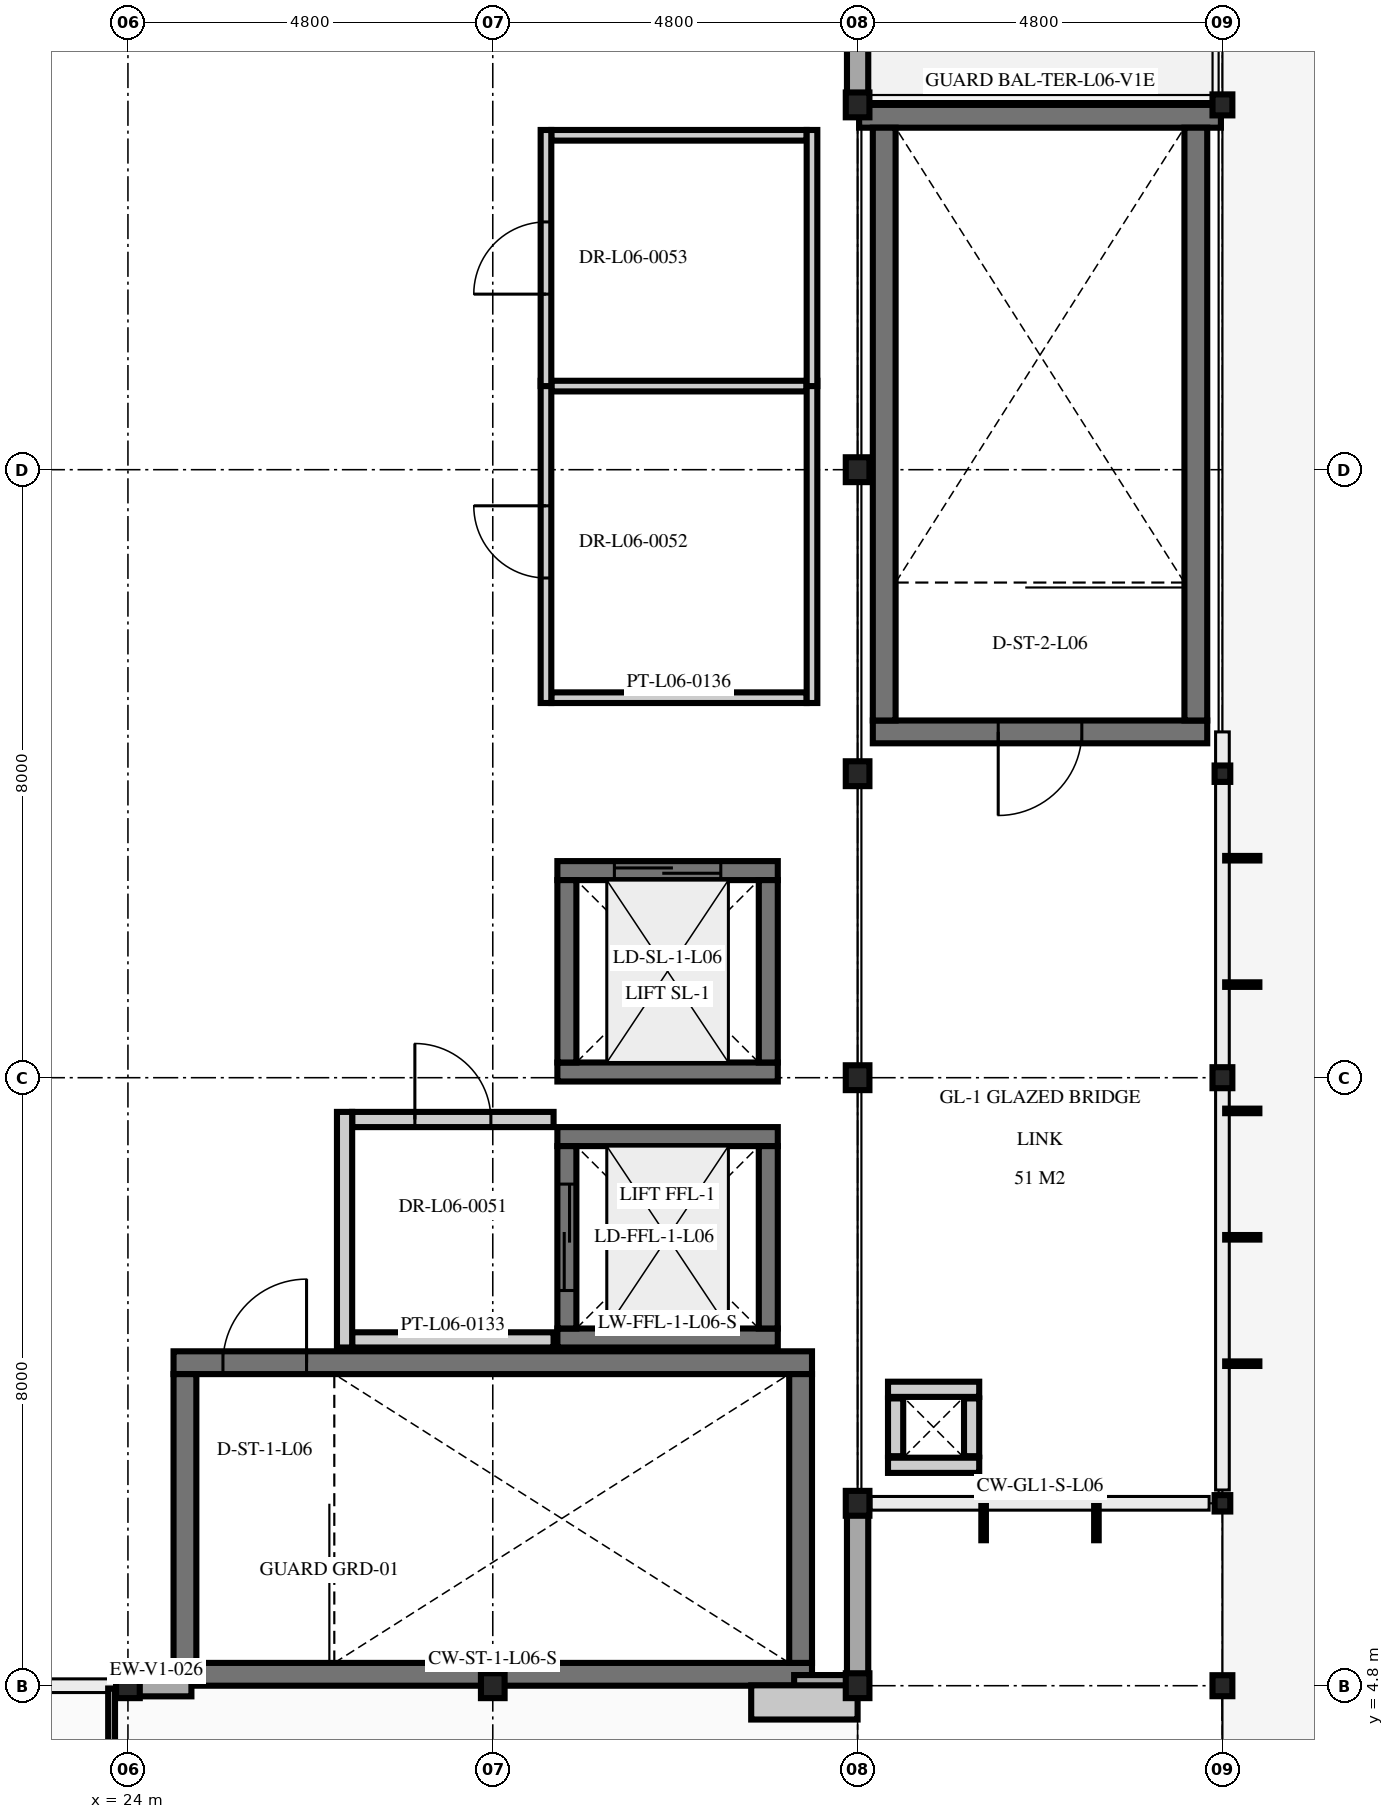
"""IFC4 building model, lengths in metres.
Left out: names, types, materials, properties, quantities, classifications, styles, units other than length and angle.
Written with IfcOpenShell. Run it as: python <this file> out.ifc"""

import sys

from ifc_helpers import new_model, si_unit, direction, frame, frame_2d, origin, origin_2d, place, context, subcontext, project, spatial, rectangle, i_section, extrude, element, fill, save


model = new_model("IFC4")
c1 = context("Model", 3, precision=1e-05, world=origin(), true_north=direction((0.0, 1.0)))
c2 = subcontext(c1, "Body", "Model", "MODEL_VIEW")
j1 = project(units=[si_unit("LENGTHUNIT", "METRE"), si_unit("PLANEANGLEUNIT", "RADIAN")], contexts=[c1])
p1 = place(None, origin())
s1 = spatial("IfcSite", under=j1, at=p1, CompositionType="ELEMENT")
p2 = place(p1, origin())
s2 = spatial("IfcBuilding", under=s1, at=p2, CompositionType="ELEMENT")
p3 = place(p2, frame((0.0, 0.0, 27.6)))
s3 = spatial("IfcBuildingStorey", under=s2, at=p3, CompositionType="ELEMENT", Elevation=27.6)
for number, where, z_axis, x_axis in (
    (1, (24.0, 4.8, 0.0), (0.0, 0.0, 1.0), (1.0, 0.0, 0.0)),
    (2, (28.8, 4.8, 0.0), (0.0, 0.0, 1.0), (1.0, 0.0, 0.0)),
    (3, (33.6, 4.8, 0.0), (0.0, 0.0, 1.0), (1.0, 0.0, 0.0)),
    (4, (33.6, 7.2, 0.0), (0.0, 0.0, 1.0), (1.0, 0.0, 0.0)),
    (5, (33.6, 12.8, 0.0), (0.0, 0.0, 1.0), (1.0, 0.0, 0.0)),
    (6, (33.6, 16.8, 0.0), (0.0, 0.0, 1.0), (1.0, 0.0, 0.0)),
    (7, (33.6, 20.8, 0.0), (0.0, 0.0, 1.0), (1.0, 0.0, 0.0)),
    (8, (33.6, 25.6, 0.0), (0.0, 0.0, 1.0), (1.0, 0.0, 0.0)),
):
    element("IfcColumn", number, at=place(p3, frame(where, z_axis=z_axis, x_axis=x_axis)), inside=s3, PredefinedType="COLUMN", context=c2, shape_type="SweptSolid", body=[
        extrude(i_section(OverallWidth=0.311, OverallDepth=0.327, WebThickness=0.016, FlangeThickness=0.025, at=origin_2d()), origin(), (0.0, 0.0, 1.0), 3.6),
    ])
for number, where, z_axis, x_axis in (
    (9, (38.4, 4.8, 0.0), (0.0, 0.0, 1.0), (1.0, 0.0, 0.0)),
    (10, (38.4, 12.8, 0.0), (0.0, 0.0, 1.0), (1.0, 0.0, 0.0)),
    (11, (38.4, 25.6, 0.0), (0.0, 0.0, 1.0), (1.0, 0.0, 0.0)),
):
    element("IfcColumn", number, at=place(p3, frame(where, z_axis=z_axis, x_axis=x_axis)), inside=s3, PredefinedType="COLUMN", context=c2, shape_type="SweptSolid", body=[
        extrude(i_section(OverallWidth=0.261, OverallDepth=0.276, WebThickness=0.015, FlangeThickness=0.025, at=origin_2d()), origin(), (0.0, 0.0, 1.0), 4.2),
    ])
for number, where, z_axis, x_axis in (
    (12, (38.4, 7.2, 0.0), (0.0, 0.0, 1.0), (1.0, 0.0, 0.0)),
    (13, (38.4, 16.8, 0.0), (0.0, 0.0, 1.0), (1.0, 0.0, 0.0)),
):
    element("IfcColumn", number, at=place(p3, frame(where, z_axis=z_axis, x_axis=x_axis)), inside=s3, PredefinedType="COLUMN", context=c2, shape_type="SweptSolid", body=[
        extrude(i_section(OverallWidth=0.206, OverallDepth=0.216, WebThickness=0.01, FlangeThickness=0.017, at=origin_2d()), origin(), (0.0, 0.0, 1.0), 4.2),
    ])
p4 = place(p3, frame((33.0, 4.95, 0.0), z_axis=(0.0, 0.0, 1.0), x_axis=(-1.0, 0.0, 0.0)))
e14 = element("IfcWall", 14, at=p4, inside=s3, PredefinedType="SHEAR", context=c2, shape_type="SweptSolid", body=[
    extrude(rectangle(XDim=8.4, YDim=0.3, at=frame_2d((4.2, 0.0))), origin(), (0.0, 0.0, 1.0), 4.015),
])
p5 = place(p3, frame((24.6, 9.05, 0.0), z_axis=(0.0, 0.0, 1.0), x_axis=(1.0, 0.0, 0.0)))
e15 = element("IfcWall", 15, at=p5, inside=s3, PredefinedType="SHEAR", context=c2, shape_type="SweptSolid", body=[
    extrude(rectangle(XDim=8.4, YDim=0.3, at=frame_2d((4.2, 0.0))), origin(), (0.0, 0.0, 1.0), 4.015),
])
p6 = place(p5, frame((0.65, 0.0, 0.0)))
e16 = element("IfcOpeningElement", 16, at=p6, cuts=e15, PredefinedType="OPENING", context=c2, shape_type="SweptSolid", body=[
    extrude(rectangle(XDim=1.1, YDim=2.2, at=frame_2d((0.55, 1.1))), frame((0.0, 0.16, 0.0), z_axis=(0.0, -1.0, 0.0), x_axis=(1.0, 0.0, 0.0)), (0.0, 0.0, 1.0), 0.32),
])
for number, where, z_axis, x_axis in (
    (17, (24.75, 5.1, 0.0), (0.0, 0.0, 1.0), (0.0, 1.0, 0.0)),
    (18, (32.85, 8.9, 0.0), (0.0, 0.0, 1.0), (0.0, -1.0, 0.0)),
):
    element("IfcWall", number, at=place(p3, frame(where, z_axis=z_axis, x_axis=x_axis)), inside=s3, PredefinedType="SHEAR", context=c2, shape_type="SweptSolid", body=[
        extrude(rectangle(XDim=3.8, YDim=0.3, at=frame_2d((1.9, 0.0))), origin(), (0.0, 0.0, 1.0), 4.015),
    ])
p7 = place(p3, frame((38.2, 17.35, 0.0), z_axis=(0.0, 0.0, 1.0), x_axis=(-1.0, 0.0, 0.0)))
e19 = element("IfcWall", 19, at=p7, inside=s3, PredefinedType="SHEAR", context=c2, shape_type="SweptSolid", body=[
    extrude(rectangle(XDim=4.4, YDim=0.3, at=frame_2d((2.2, 0.0))), origin(), (0.0, 0.0, 1.0), 3.955),
])
p8 = place(p7, frame((1.65, 0.0, 0.0)))
e20 = element("IfcOpeningElement", 20, at=p8, cuts=e19, PredefinedType="OPENING", context=c2, shape_type="SweptSolid", body=[
    extrude(rectangle(XDim=1.1, YDim=2.2, at=frame_2d((0.55, 1.1))), frame((0.0, 0.16, 0.0), z_axis=(0.0, -1.0, 0.0), x_axis=(1.0, 0.0, 0.0)), (0.0, 0.0, 1.0), 0.32),
])
p9 = place(p3, frame((33.62, 25.45, 0.0), z_axis=(0.0, 0.0, 1.0), x_axis=(1.0, 0.0, 0.0)))
e21 = element("IfcWall", 21, at=p9, inside=s3, PredefinedType="SHEAR", context=c2, shape_type="SweptSolid", body=[
    extrude(rectangle(XDim=4.76, YDim=0.3, at=frame_2d((2.38, 0.0))), origin(), (0.0, 0.0, 1.0), 3.955),
])
for number, where, z_axis, x_axis in (
    (22, (33.95, 17.5, 0.0), (0.0, 0.0, 1.0), (0.0, 1.0, 0.0)),
    (23, (38.05, 25.3, 0.0), (0.0, 0.0, 1.0), (0.0, -1.0, 0.0)),
):
    element("IfcWall", number, at=place(p3, frame(where, z_axis=z_axis, x_axis=x_axis)), inside=s3, PredefinedType="SHEAR", context=c2, shape_type="SweptSolid", body=[
        extrude(rectangle(XDim=7.8, YDim=0.3, at=frame_2d((3.9, 0.0))), origin(), (0.0, 0.0, 1.0), 3.955),
    ])
for number, where, z_axis, x_axis in (
    (24, (32.55, 9.375, 0.0), (0.0, 0.0, 1.0), (-1.0, 0.0, 0.0)),
    (25, (29.65, 12.025, 0.0), (0.0, 0.0, 1.0), (1.0, 0.0, 0.0)),
):
    element("IfcWall", number, at=place(p3, frame(where, z_axis=z_axis, x_axis=x_axis)), inside=s3, PredefinedType="SHEAR", context=c2, shape_type="SweptSolid", body=[
        extrude(rectangle(XDim=2.9, YDim=0.25, at=frame_2d((1.45, 0.0))), origin(), (0.0, 0.0, 1.0), 4.015),
    ])
p10 = place(p3, frame((29.775, 9.5, 0.0), z_axis=(0.0, 0.0, 1.0), x_axis=(0.0, 1.0, 0.0)))
e26 = element("IfcWall", 26, at=p10, inside=s3, PredefinedType="SHEAR", context=c2, shape_type="SweptSolid", body=[
    extrude(rectangle(XDim=2.4, YDim=0.25, at=frame_2d((1.2, 0.0))), origin(), (0.0, 0.0, 1.0), 4.015),
])
p11 = place(p10, frame((0.5, 0.0, 0.0)))
e27 = element("IfcOpeningElement", 27, at=p11, cuts=e26, PredefinedType="OPENING", context=c2, shape_type="SweptSolid", body=[
    extrude(rectangle(XDim=1.4, YDim=2.2, at=frame_2d((0.7, 1.1))), frame((0.0, 0.135, 0.0), z_axis=(0.0, -1.0, 0.0), x_axis=(1.0, 0.0, 0.0)), (0.0, 0.0, 1.0), 0.27),
])
p12 = place(p3, frame((32.425, 11.9, 0.0), z_axis=(0.0, 0.0, 1.0), x_axis=(0.0, -1.0, 0.0)))
e28 = element("IfcWall", 28, at=p12, inside=s3, PredefinedType="SHEAR", context=c2, shape_type="SweptSolid", body=[
    extrude(rectangle(XDim=2.4, YDim=0.25, at=frame_2d((1.2, 0.0))), origin(), (0.0, 0.0, 1.0), 4.015),
])
p13 = place(p3, frame((32.55, 12.875, 0.0), z_axis=(0.0, 0.0, 1.0), x_axis=(-1.0, 0.0, 0.0)))
e29 = element("IfcWall", 29, at=p13, inside=s3, PredefinedType="SHEAR", context=c2, shape_type="SweptSolid", body=[
    extrude(rectangle(XDim=2.9, YDim=0.25, at=frame_2d((1.45, 0.0))), origin(), (0.0, 0.0, 1.0), 4.015),
])
p14 = place(p3, frame((29.65, 15.525, 0.0), z_axis=(0.0, 0.0, 1.0), x_axis=(1.0, 0.0, 0.0)))
e30 = element("IfcWall", 30, at=p14, inside=s3, PredefinedType="SHEAR", context=c2, shape_type="SweptSolid", body=[
    extrude(rectangle(XDim=2.9, YDim=0.25, at=frame_2d((1.45, 0.0))), origin(), (0.0, 0.0, 1.0), 4.015),
])
p15 = place(p14, frame((0.75, 0.0, 0.0)))
e31 = element("IfcOpeningElement", 31, at=p15, cuts=e30, PredefinedType="OPENING", context=c2, shape_type="SweptSolid", body=[
    extrude(rectangle(XDim=1.4, YDim=2.2, at=frame_2d((0.7, 1.1))), frame((0.0, 0.135, 0.0), z_axis=(0.0, -1.0, 0.0), x_axis=(1.0, 0.0, 0.0)), (0.0, 0.0, 1.0), 0.27),
])
for number, where, z_axis, x_axis in (
    (32, (29.775, 13.0, 0.0), (0.0, 0.0, 1.0), (0.0, 1.0, 0.0)),
    (33, (32.425, 15.4, 0.0), (0.0, 0.0, 1.0), (0.0, -1.0, 0.0)),
):
    element("IfcWall", number, at=place(p3, frame(where, z_axis=z_axis, x_axis=x_axis)), inside=s3, PredefinedType="SHEAR", context=c2, shape_type="SweptSolid", body=[
        extrude(rectangle(XDim=2.4, YDim=0.25, at=frame_2d((1.2, 0.0))), origin(), (0.0, 0.0, 1.0), 4.015),
    ])
p16 = place(p2, frame((0.0, 0.0, 23.1)))
s4 = spatial("IfcBuildingStorey", under=s2, at=p16, CompositionType="ELEMENT", Elevation=23.1)
p17 = place(p16, frame((40.8, 5.5, 0.0), z_axis=(0.0, 0.0, 1.0), x_axis=(-1.0, 0.0, 0.0)))
e34 = element("IfcWall", 34, at=p17, inside=s4, PredefinedType="PARTITIONING", context=c2, shape_type="SweptSolid", body=[
    extrude(rectangle(XDim=1.2, YDim=0.2, at=frame_2d((0.6, 0.0))), origin(), (0.0, 0.0, 1.0), 12.798),
])
p18 = place(p16, frame((39.7, 5.62, 0.0), z_axis=(0.0, 0.0, 1.0), x_axis=(0.0, 1.0, 0.0)))
e35 = element("IfcWall", 35, at=p18, inside=s4, PredefinedType="PARTITIONING", context=c2, shape_type="SweptSolid", body=[
    extrude(rectangle(XDim=0.76, YDim=0.2, at=frame_2d((0.38, 0.0))), origin(), (0.0, 0.0, 1.0), 12.798),
])
for number, where, z_axis, x_axis in (
    (36, (35.2, 7.7, 0.0), (0.0, 0.0, 1.0), (-1.0, 0.0, 0.0)),
    (37, (34.0, 8.7, 0.0), (0.0, 0.0, 1.0), (1.0, 0.0, 0.0)),
):
    element("IfcWall", number, at=place(p3, frame(where, z_axis=z_axis, x_axis=x_axis)), inside=s3, PredefinedType="PARTITIONING", context=c2, shape_type="SweptSolid", body=[
        extrude(rectangle(XDim=1.2, YDim=0.2, at=frame_2d((0.6, 0.0))), origin(), (0.0, 0.0, 1.0), 3.455),
    ])
for number, where, z_axis, x_axis in (
    (38, (34.1, 7.82, 0.0), (0.0, 0.0, 1.0), (0.0, 1.0, 0.0)),
    (39, (35.1, 8.58, 0.0), (0.0, 0.0, 1.0), (0.0, -1.0, 0.0)),
):
    element("IfcWall", number, at=place(p3, frame(where, z_axis=z_axis, x_axis=x_axis)), inside=s3, PredefinedType="PARTITIONING", context=c2, shape_type="SweptSolid", body=[
        extrude(rectangle(XDim=0.76, YDim=0.2, at=frame_2d((0.38, 0.0))), origin(), (0.0, 0.0, 1.0), 3.455),
    ])
p19 = place(p3, frame((24.835, 4.8, 0.0), z_axis=(0.0, 0.0, 1.0), x_axis=(-1.0, 0.0, 0.0)))
e40 = element("IfcWall", 40, at=p19, inside=s3, PredefinedType="SOLIDWALL", context=c2, shape_type="SweptSolid", body=[
    extrude(rectangle(XDim=0.92, YDim=0.28, at=frame_2d((0.46, 0.0))), origin(), (0.0, 0.0, 1.0), 3.575),
])
p20 = place(p3, frame((33.685, 4.8, 0.0), z_axis=(0.0, 0.0, 1.0), x_axis=(-1.0, 0.0, 0.0)))
e41 = element("IfcWall", 41, at=p20, inside=s3, PredefinedType="SOLIDWALL", context=c2, shape_type="SweptSolid", body=[
    extrude(rectangle(XDim=0.92, YDim=0.28, at=frame_2d((0.46, 0.0))), origin(), (0.0, 0.0, 1.0), 3.575),
])
p21 = place(p3, frame((33.6, 7.285, 0.0), z_axis=(0.0, 0.0, 1.0), x_axis=(0.0, -1.0, 0.0)))
e42 = element("IfcWall", 42, at=p21, inside=s3, PredefinedType="SOLIDWALL", context=c2, shape_type="SweptSolid", body=[
    extrude(rectangle(XDim=2.57, YDim=0.28, at=frame_2d((1.285, 0.0))), origin(), (0.0, 0.0, 1.0), 3.185),
])
p22 = place(p3, frame((33.6, 36.885, 0.0), z_axis=(0.0, 0.0, 1.0), x_axis=(0.0, -1.0, 0.0)))
e43 = element("IfcWall", 43, at=p22, inside=s3, PredefinedType="SOLIDWALL", context=c2, shape_type="SweptSolid", body=[
    extrude(rectangle(XDim=11.37, YDim=0.28, at=frame_2d((5.685, 0.0))), origin(), (0.0, 0.0, 1.0), 3.185),
])
p23 = place(p22, frame((4.785, 0.0, 0.0)))
e44 = element("IfcOpeningElement", 44, at=p23, cuts=e43, PredefinedType="OPENING", context=c2, shape_type="SweptSolid", body=[
    extrude(rectangle(XDim=1.8, YDim=2.3, at=frame_2d((0.9, 1.15))), frame((0.0, 0.15, 0.0), z_axis=(0.0, -1.0, 0.0), x_axis=(1.0, 0.0, 0.0)), (0.0, 0.0, 1.0), 0.3),
])
p24 = place(p3, frame((26.95, 9.35, 0.0), z_axis=(0.0, 0.0, 1.0), x_axis=(1.0, 0.0, 0.0)))
e45 = element("IfcWall", 45, at=p24, inside=s3, PredefinedType="PARTITIONING", context=c2, shape_type="SweptSolid", body=[
    extrude(rectangle(XDim=2.65, YDim=0.2, at=frame_2d((1.325, 0.0))), origin(), (0.0, 0.0, 1.0), 4.0),
])
p25 = place(p3, frame((26.95, 12.25, 0.0), z_axis=(0.0, 0.0, 1.0), x_axis=(1.0, 0.0, 0.0)))
e46 = element("IfcWall", 46, at=p25, inside=s3, PredefinedType="PARTITIONING", context=c2, shape_type="SweptSolid", body=[
    extrude(rectangle(XDim=2.65, YDim=0.2, at=frame_2d((1.325, 0.0))), origin(), (0.0, 0.0, 1.0), 4.0),
])
p26 = place(p25, frame((0.825, 0.0, 0.0)))
e47 = element("IfcOpeningElement", 47, at=p26, cuts=e46, PredefinedType="OPENING", context=c2, shape_type="SweptSolid", body=[
    extrude(rectangle(XDim=1.0, YDim=2.2, at=frame_2d((0.5, 1.1))), frame((0.0, 0.11, 0.0), z_axis=(0.0, -1.0, 0.0), x_axis=(1.0, 0.0, 0.0)), (0.0, 0.0, 1.0), 0.22),
])
p27 = place(p3, frame((26.85, 9.25, 0.0), z_axis=(0.0, 0.0, 1.0), x_axis=(0.0, 1.0, 0.0)))
e48 = element("IfcWall", 48, at=p27, inside=s3, PredefinedType="PARTITIONING", context=c2, shape_type="SweptSolid", body=[
    extrude(rectangle(XDim=3.1, YDim=0.2, at=frame_2d((1.55, 0.0))), origin(), (0.0, 0.0, 1.0), 4.0),
])
for number, where, z_axis, x_axis in (
    (49, (29.57, 17.8, 0.0), (0.0, 0.0, 1.0), (1.0, 0.0, 0.0)),
    (50, (29.57, 21.9, 0.0), (0.0, 0.0, 1.0), (1.0, 0.0, 0.0)),
):
    element("IfcWall", number, at=place(p3, frame(where, z_axis=z_axis, x_axis=x_axis)), inside=s3, PredefinedType="PARTITIONING", context=c2, shape_type="SweptSolid", body=[
        extrude(rectangle(XDim=3.36, YDim=0.14, at=frame_2d((1.68, 0.0))), origin(), (0.0, 0.0, 1.0), 4.0),
    ])
p28 = place(p3, frame((29.5, 17.73, 0.0), z_axis=(0.0, 0.0, 1.0), x_axis=(0.0, 1.0, 0.0)))
e51 = element("IfcWall", 51, at=p28, inside=s3, PredefinedType="PARTITIONING", context=c2, shape_type="SweptSolid", body=[
    extrude(rectangle(XDim=4.24, YDim=0.14, at=frame_2d((2.12, 0.0))), origin(), (0.0, 0.0, 1.0), 4.0),
])
p29 = place(p28, frame((1.645, 0.0, 0.0)))
e52 = element("IfcOpeningElement", 52, at=p29, cuts=e51, PredefinedType="OPENING", context=c2, shape_type="SweptSolid", body=[
    extrude(rectangle(XDim=0.95, YDim=2.1, at=frame_2d((0.475, 1.05))), frame((0.0, 0.08, 0.0), z_axis=(0.0, -1.0, 0.0), x_axis=(1.0, 0.0, 0.0)), (0.0, 0.0, 1.0), 0.16),
])
p30 = place(p3, frame((33.0, 17.73, 0.0), z_axis=(0.0, 0.0, 1.0), x_axis=(0.0, 1.0, 0.0)))
e53 = element("IfcWall", 53, at=p30, inside=s3, PredefinedType="PARTITIONING", context=c2, shape_type="SweptSolid", body=[
    extrude(rectangle(XDim=4.24, YDim=0.14, at=frame_2d((2.12, 0.0))), origin(), (0.0, 0.0, 1.0), 4.0),
])
p31 = place(p3, frame((29.57, 25.2, 0.0), z_axis=(0.0, 0.0, 1.0), x_axis=(1.0, 0.0, 0.0)))
e54 = element("IfcWall", 54, at=p31, inside=s3, PredefinedType="PARTITIONING", context=c2, shape_type="SweptSolid", body=[
    extrude(rectangle(XDim=3.36, YDim=0.14, at=frame_2d((1.68, 0.0))), origin(), (0.0, 0.0, 1.0), 4.0),
])
p32 = place(p3, frame((29.5, 21.9, 0.0), z_axis=(0.0, 0.0, 1.0), x_axis=(0.0, 1.0, 0.0)))
e55 = element("IfcWall", 55, at=p32, inside=s3, PredefinedType="PARTITIONING", context=c2, shape_type="SweptSolid", body=[
    extrude(rectangle(XDim=3.37, YDim=0.14, at=frame_2d((1.685, 0.0))), origin(), (0.0, 0.0, 1.0), 4.0),
])
p33 = place(p32, frame((1.21, 0.0, 0.0)))
e56 = element("IfcOpeningElement", 56, at=p33, cuts=e55, PredefinedType="OPENING", context=c2, shape_type="SweptSolid", body=[
    extrude(rectangle(XDim=0.95, YDim=2.1, at=frame_2d((0.475, 1.05))), frame((0.0, 0.08, 0.0), z_axis=(0.0, -1.0, 0.0), x_axis=(1.0, 0.0, 0.0)), (0.0, 0.0, 1.0), 0.16),
])
p34 = place(p3, frame((33.0, 21.9, 0.0), z_axis=(0.0, 0.0, 1.0), x_axis=(0.0, 1.0, 0.0)))
e57 = element("IfcWall", 57, at=p34, inside=s3, PredefinedType="PARTITIONING", context=c2, shape_type="SweptSolid", body=[
    extrude(rectangle(XDim=3.37, YDim=0.14, at=frame_2d((1.685, 0.0))), origin(), (0.0, 0.0, 1.0), 4.0),
])
p35 = place(p6, origin())
e58 = element("IfcDoor", 58, at=p35, inside=s3, OperationType="SINGLE_SWING_RIGHT", PredefinedType="DOOR", context=c2, shape_type="SweptSolid", body=[
    extrude(rectangle(XDim=1.1, YDim=2.2, at=frame_2d((0.55, 1.1))), frame((0.0, 0.025, 0.0), z_axis=(0.0, -1.0, 0.0), x_axis=(1.0, 0.0, 0.0)), (0.0, 0.0, 1.0), 0.05),
])
fill(e16, e58)
p36 = place(p8, origin())
e59 = element("IfcDoor", 59, at=p36, inside=s3, OperationType="SINGLE_SWING_RIGHT", PredefinedType="DOOR", context=c2, shape_type="SweptSolid", body=[
    extrude(rectangle(XDim=1.1, YDim=2.2, at=frame_2d((0.55, 1.1))), frame((0.0, 0.025, 0.0), z_axis=(0.0, -1.0, 0.0), x_axis=(1.0, 0.0, 0.0)), (0.0, 0.0, 1.0), 0.05),
])
fill(e20, e59)
p37 = place(p11, origin())
e60 = element("IfcDoor", 60, at=p37, inside=s3, OperationType="DOUBLE_DOOR_SLIDING", PredefinedType="DOOR", context=c2, shape_type="SweptSolid", body=[
    extrude(rectangle(XDim=1.4, YDim=2.2, at=frame_2d((0.7, 1.1))), frame((0.0, 0.025, 0.0), z_axis=(0.0, -1.0, 0.0), x_axis=(1.0, 0.0, 0.0)), (0.0, 0.0, 1.0), 0.05),
])
fill(e27, e60)
p38 = place(p15, origin())
e61 = element("IfcDoor", 61, at=p38, inside=s3, OperationType="DOUBLE_DOOR_SLIDING", PredefinedType="DOOR", context=c2, shape_type="SweptSolid", body=[
    extrude(rectangle(XDim=1.4, YDim=2.2, at=frame_2d((0.7, 1.1))), frame((0.0, 0.025, 0.0), z_axis=(0.0, -1.0, 0.0), x_axis=(1.0, 0.0, 0.0)), (0.0, 0.0, 1.0), 0.05),
])
fill(e31, e61)
p39 = place(p26, origin())
e62 = element("IfcDoor", 62, at=p39, inside=s3, OperationType="SINGLE_SWING_LEFT", PredefinedType="DOOR", context=c2, shape_type="SweptSolid", body=[
    extrude(rectangle(XDim=1.0, YDim=2.2, at=frame_2d((0.5, 1.1))), frame((0.0, 0.025, 0.0), z_axis=(0.0, -1.0, 0.0), x_axis=(1.0, 0.0, 0.0)), (0.0, 0.0, 1.0), 0.05),
])
fill(e47, e62)
p40 = place(p29, origin())
e63 = element("IfcDoor", 63, at=p40, inside=s3, OperationType="SINGLE_SWING_RIGHT", PredefinedType="DOOR", context=c2, shape_type="SweptSolid", body=[
    extrude(rectangle(XDim=0.95, YDim=2.1, at=frame_2d((0.475, 1.05))), frame((0.0, 0.025, 0.0), z_axis=(0.0, -1.0, 0.0), x_axis=(1.0, 0.0, 0.0)), (0.0, 0.0, 1.0), 0.05),
])
fill(e52, e63)
p41 = place(p33, origin())
e64 = element("IfcDoor", 64, at=p41, inside=s3, OperationType="SINGLE_SWING_LEFT", PredefinedType="DOOR", context=c2, shape_type="SweptSolid", body=[
    extrude(rectangle(XDim=0.95, YDim=2.1, at=frame_2d((0.475, 1.05))), frame((0.0, 0.025, 0.0), z_axis=(0.0, -1.0, 0.0), x_axis=(1.0, 0.0, 0.0)), (0.0, 0.0, 1.0), 0.05),
])
fill(e56, e64)
save(model, sys.argv[1])
